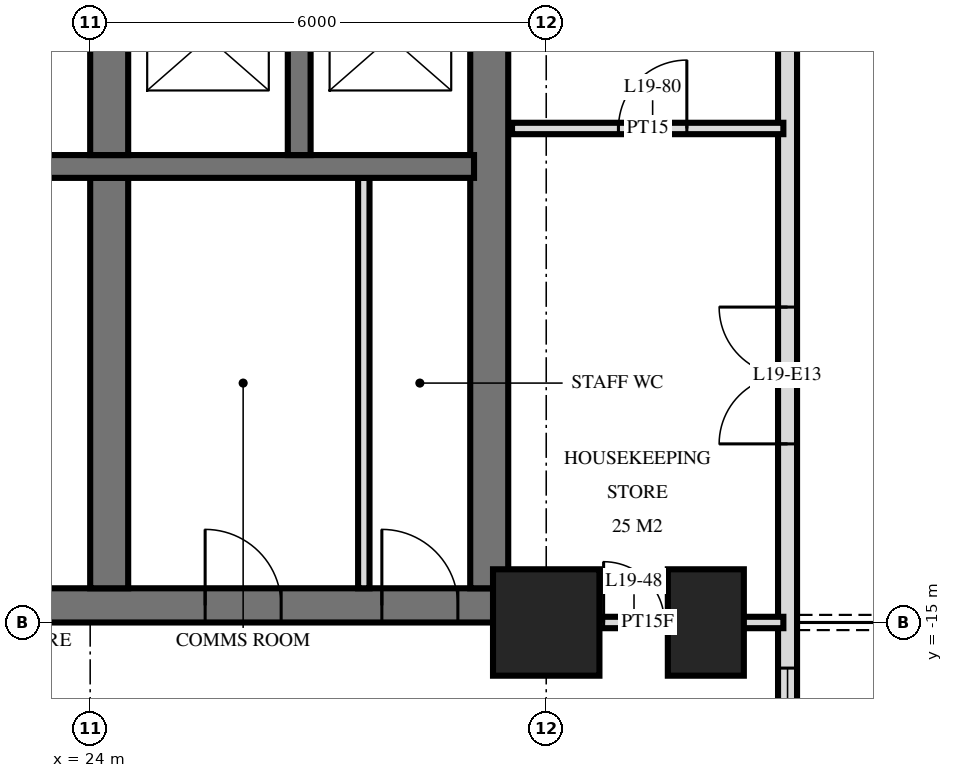
"""IFC4 building model, lengths in metres.
Left out: names, types, materials, properties, quantities, classifications, styles, units other than length and angle.
Written with IfcOpenShell. Run it as: python <this file> out.ifc"""

import sys

from ifc_helpers import new_model, si_unit, direction, frame, frame_2d, origin, origin_2d, place, context, subcontext, project, spatial, rectangle, extrude, element, fill, save


model = new_model("IFC4")
c1 = context("Model", 3, precision=1e-05, world=origin(), true_north=direction((0.0, 1.0)))
c2 = subcontext(c1, "Body", "Model", "MODEL_VIEW")
j1 = project(units=[si_unit("LENGTHUNIT", "METRE"), si_unit("PLANEANGLEUNIT", "RADIAN")], contexts=[c1])
p1 = place(None, origin())
s1 = spatial("IfcSite", under=j1, at=p1, CompositionType="ELEMENT")
p2 = place(p1, origin())
s2 = spatial("IfcBuilding", under=s1, at=p2, CompositionType="ELEMENT")
p3 = place(p2, frame((0.0, 0.0, 78.0)))
s3 = spatial("IfcBuildingStorey", under=s2, at=p3, CompositionType="ELEMENT", Elevation=78.0)
p4 = place(p3, frame((30.0, -15.0, 0.0), z_axis=(0.0, 0.0, 1.0), x_axis=(1.0, 0.0, 0.0)))
e1 = element("IfcColumn", 1, at=p4, inside=s3, PredefinedType="COLUMN", context=c2, shape_type="SweptSolid", body=[
    extrude(rectangle(XDim=1.4, YDim=1.4, at=origin_2d()), origin(), (0.0, 0.0, 1.0), 3.6),
])
p5 = place(p3, frame((32.1, -15.0, 0.0), z_axis=(0.0, 0.0, 1.0), x_axis=(0.0, 1.0, 0.0)))
e2 = element("IfcColumn", 2, at=p5, inside=s3, PredefinedType="COLUMN", context=c2, shape_type="SweptSolid", body=[
    extrude(rectangle(XDim=1.4, YDim=1.0, at=origin_2d()), origin(), (0.0, 0.0, 1.0), 3.6),
])
p6 = place(p3, frame((10.0, -14.775, 0.0), z_axis=(0.0, 0.0, 1.0), x_axis=(1.0, 0.0, 0.0)))
e3 = element("IfcWall", 3, at=p6, inside=s3, PredefinedType="SHEAR", context=c2, shape_type="SweptSolid", body=[
    extrude(rectangle(XDim=19.5, YDim=0.45, at=frame_2d((9.75, 0.0))), origin(), (0.0, 0.0, 1.0), 3.6),
])
p7 = place(p6, frame((7.1, 0.0, 0.0)))
e4 = element("IfcOpeningElement", 4, at=p7, cuts=e3, PredefinedType="OPENING", context=c2, shape_type="SweptSolid", body=[
    extrude(rectangle(XDim=1.2, YDim=2.1, at=frame_2d((0.6, 1.05))), frame((0.0, 0.235, 0.0), z_axis=(0.0, -1.0, 0.0), x_axis=(1.0, 0.0, 0.0)), (0.0, 0.0, 1.0), 0.47),
])
p8 = place(p6, frame((4.15, 0.0, 0.0)))
e5 = element("IfcOpeningElement", 5, at=p8, cuts=e3, PredefinedType="OPENING", context=c2, shape_type="SweptSolid", body=[
    extrude(rectangle(XDim=1.1, YDim=2.1, at=frame_2d((0.55, 1.05))), frame((0.0, 0.235, 0.0), z_axis=(0.0, -1.0, 0.0), x_axis=(1.0, 0.0, 0.0)), (0.0, 0.0, 1.0), 0.47),
])
p9 = place(p6, frame((10.1, 0.0, 0.0)))
e6 = element("IfcOpeningElement", 6, at=p9, cuts=e3, PredefinedType="OPENING", context=c2, shape_type="SweptSolid", body=[
    extrude(rectangle(XDim=0.9, YDim=2.1, at=frame_2d((0.45, 1.05))), frame((0.0, 0.235, 0.0), z_axis=(0.0, -1.0, 0.0), x_axis=(1.0, 0.0, 0.0)), (0.0, 0.0, 1.0), 0.47),
])
p10 = place(p6, frame((12.45, 0.0, 0.0)))
e7 = element("IfcOpeningElement", 7, at=p10, cuts=e3, PredefinedType="OPENING", context=c2, shape_type="SweptSolid", body=[
    extrude(rectangle(XDim=1.0, YDim=2.1, at=frame_2d((0.5, 1.05))), frame((0.0, 0.235, 0.0), z_axis=(0.0, -1.0, 0.0), x_axis=(1.0, 0.0, 0.0)), (0.0, 0.0, 1.0), 0.47),
])
p11 = place(p6, frame((15.512, 0.0, 0.0)))
e8 = element("IfcOpeningElement", 8, at=p11, cuts=e3, PredefinedType="OPENING", context=c2, shape_type="SweptSolid", body=[
    extrude(rectangle(XDim=1.0, YDim=2.1, at=frame_2d((0.5, 1.05))), frame((0.0, 0.235, 0.0), z_axis=(0.0, -1.0, 0.0), x_axis=(1.0, 0.0, 0.0)), (0.0, 0.0, 1.0), 0.47),
])
p12 = place(p6, frame((17.837, 0.0, 0.0)))
e9 = element("IfcOpeningElement", 9, at=p12, cuts=e3, PredefinedType="OPENING", context=c2, shape_type="SweptSolid", body=[
    extrude(rectangle(XDim=1.0, YDim=2.1, at=frame_2d((0.5, 1.05))), frame((0.0, 0.235, 0.0), z_axis=(0.0, -1.0, 0.0), x_axis=(1.0, 0.0, 0.0)), (0.0, 0.0, 1.0), 0.47),
])
p13 = place(p3, frame((29.25, -14.55, 0.0), z_axis=(0.0, 0.0, 1.0), x_axis=(0.0, 1.0, 0.0)))
e10 = element("IfcWall", 10, at=p13, inside=s3, PredefinedType="SHEAR", context=c2, shape_type="SweptSolid", body=[
    extrude(rectangle(XDim=14.1, YDim=0.5, at=frame_2d((7.05, 0.0))), origin(), (0.0, 0.0, 1.0), 3.6),
])
p14 = place(p3, frame((10.35, -9.0, 0.0), z_axis=(0.0, 0.0, 1.0), x_axis=(1.0, 0.0, 0.0)))
e11 = element("IfcWall", 11, at=p14, inside=s3, PredefinedType="SHEAR", context=c2, shape_type="SweptSolid", body=[
    extrude(rectangle(XDim=18.7, YDim=0.3, at=frame_2d((9.35, 0.0))), origin(), (0.0, 0.0, 1.0), 3.6),
])
p15 = place(p14, frame((3.8, 0.0, 0.0)))
e12 = element("IfcOpeningElement", 12, at=p15, cuts=e11, PredefinedType="OPENING", context=c2, shape_type="SweptSolid", body=[
    extrude(rectangle(XDim=1.1, YDim=2.1, at=frame_2d((0.55, 1.05))), frame((0.0, 0.16, 0.0), z_axis=(0.0, -1.0, 0.0), x_axis=(1.0, 0.0, 0.0)), (0.0, 0.0, 1.0), 0.32),
])
p16 = place(p3, frame((24.25, -8.85, 0.0), z_axis=(0.0, 0.0, 1.0), x_axis=(0.0, 1.0, 0.0)))
e13 = element("IfcWall", 13, at=p16, inside=s3, PredefinedType="SHEAR", context=c2, shape_type="SweptSolid", body=[
    extrude(rectangle(XDim=2.3, YDim=0.5, at=frame_2d((1.15, 0.0))), origin(), (0.0, 0.0, 1.0), 3.6),
])
p17 = place(p3, frame((24.25, -14.55, 0.0), z_axis=(0.0, 0.0, 1.0), x_axis=(0.0, 1.0, 0.0)))
e14 = element("IfcWall", 14, at=p17, inside=s3, PredefinedType="SHEAR", context=c2, shape_type="SweptSolid", body=[
    extrude(rectangle(XDim=5.4, YDim=0.5, at=frame_2d((2.7, 0.0))), origin(), (0.0, 0.0, 1.0), 3.6),
])
p18 = place(p3, frame((26.75, -8.85, 0.0), z_axis=(0.0, 0.0, 1.0), x_axis=(0.0, 1.0, 0.0)))
e15 = element("IfcWall", 15, at=p18, inside=s3, PredefinedType="SHEAR", context=c2, shape_type="SweptSolid", body=[
    extrude(rectangle(XDim=2.3, YDim=0.3, at=frame_2d((1.15, 0.0))), origin(), (0.0, 0.0, 1.0), 3.6),
])
p19 = place(p3, frame((33.175, -24.875, 0.0), z_axis=(0.0, 0.0, 1.0), x_axis=(0.0, 1.0, 0.0)))
e16 = element("IfcWall", 16, at=p19, inside=s3, PredefinedType="SOLIDWALL", context=c2, shape_type="SweptSolid", body=[
    extrude(rectangle(XDim=21.551, YDim=0.25, at=frame_2d((10.775, 0.0))), origin(), (0.0, 0.0, 1.0), 3.32),
])
p20 = place(p19, frame((0.575, 0.0, 0.0)))
e17 = element("IfcOpeningElement", 17, at=p20, cuts=e16, PredefinedType="OPENING", context=c2, shape_type="SweptSolid", body=[
    extrude(rectangle(XDim=1.8, YDim=2.4, at=frame_2d((0.9, 1.2))), frame((0.0, 0.135, 0.0), z_axis=(0.0, -1.0, 0.0), x_axis=(1.0, 0.0, 0.0)), (0.0, 0.0, 1.0), 0.27),
])
p21 = place(p19, frame((3.875, 0.0, 0.0)))
e18 = element("IfcOpeningElement", 18, at=p21, cuts=e16, PredefinedType="OPENING", context=c2, shape_type="SweptSolid", body=[
    extrude(rectangle(XDim=1.8, YDim=2.4, at=frame_2d((0.9, 1.2))), frame((0.0, 0.135, 0.0), z_axis=(0.0, -1.0, 0.0), x_axis=(1.0, 0.0, 0.0)), (0.0, 0.0, 1.0), 0.27),
])
p22 = place(p19, frame((8.075, 0.0, 0.3)))
e19 = element("IfcOpeningElement", 19, at=p22, cuts=e16, PredefinedType="OPENING", context=c2, shape_type="SweptSolid", body=[
    extrude(rectangle(XDim=1.2, YDim=2.1, at=frame_2d((0.6, 1.05))), frame((0.0, 0.135, 0.0), z_axis=(0.0, -1.0, 0.0), x_axis=(1.0, 0.0, 0.0)), (0.0, 0.0, 1.0), 0.27),
])
p23 = place(p19, frame((12.225, 0.0, 0.0)))
e20 = element("IfcOpeningElement", 20, at=p23, cuts=e16, PredefinedType="OPENING", context=c2, shape_type="SweptSolid", body=[
    extrude(rectangle(XDim=1.8, YDim=2.4, at=frame_2d((0.9, 1.2))), frame((0.0, 0.135, 0.0), z_axis=(0.0, -1.0, 0.0), x_axis=(1.0, 0.0, 0.0)), (0.0, 0.0, 1.0), 0.27),
])
p24 = place(p3, frame((27.6, -14.55, 0.0), z_axis=(0.0, 0.0, 1.0), x_axis=(0.0, 1.0, 0.0)))
e21 = element("IfcWall", 21, at=p24, inside=s3, PredefinedType="PARTITIONING", context=c2, shape_type="SweptSolid", body=[
    extrude(rectangle(XDim=5.4, YDim=0.15, at=frame_2d((2.7, 0.0))), origin(), (0.0, 0.0, 1.0), 3.3),
])
p25 = place(p3, frame((29.55, -15.0, 0.0), z_axis=(0.0, 0.0, 1.0), x_axis=(1.0, 0.0, 0.0)))
e22 = element("IfcWall", 22, at=p25, inside=s3, PredefinedType="PARTITIONING", context=c2, shape_type="SweptSolid", body=[
    extrude(rectangle(XDim=3.57, YDim=0.15, at=frame_2d((1.785, 0.0))), origin(), (0.0, 0.0, 1.0), 3.32),
])
p26 = place(p25, frame((1.205, 0.0, 0.0)))
e23 = element("IfcOpeningElement", 23, at=p26, cuts=e22, PredefinedType="OPENING", context=c2, shape_type="SweptSolid", body=[
    extrude(rectangle(XDim=0.8, YDim=2.1, at=frame_2d((0.4, 1.05))), frame((0.0, 0.085, 0.0), z_axis=(0.0, -1.0, 0.0), x_axis=(1.0, 0.0, 0.0)), (0.0, 0.0, 1.0), 0.17),
])
p27 = place(p3, frame((29.55, -8.5, 0.0), z_axis=(0.0, 0.0, 1.0), x_axis=(1.0, 0.0, 0.0)))
e24 = element("IfcWall", 24, at=p27, inside=s3, PredefinedType="PARTITIONING", context=c2, shape_type="SweptSolid", body=[
    extrude(rectangle(XDim=3.57, YDim=0.15, at=frame_2d((1.785, 0.0))), origin(), (0.0, 0.0, 1.0), 3.32),
])
p28 = place(p27, frame((1.4, 0.0, 0.0)))
e25 = element("IfcOpeningElement", 25, at=p28, cuts=e24, PredefinedType="OPENING", context=c2, shape_type="SweptSolid", body=[
    extrude(rectangle(XDim=0.9, YDim=2.1, at=frame_2d((0.45, 1.05))), frame((0.0, 0.085, 0.0), z_axis=(0.0, -1.0, 0.0), x_axis=(1.0, 0.0, 0.0)), (0.0, 0.0, 1.0), 0.17),
])
p29 = place(p22, origin())
e26 = element("IfcWindow", 26, at=p29, inside=s3, PartitioningType="SINGLE_PANEL", PredefinedType="WINDOW", context=c2, shape_type="SweptSolid", body=[
    extrude(rectangle(XDim=1.2, YDim=2.1, at=frame_2d((0.6, 1.05))), frame((0.0, 0.03, 0.0), z_axis=(0.0, -1.0, 0.0), x_axis=(1.0, 0.0, 0.0)), (0.0, 0.0, 1.0), 0.06),
])
fill(e19, e26)
p30 = place(p23, origin())
e27 = element("IfcDoor", 27, at=p30, inside=s3, OperationType="DOUBLE_DOOR_SINGLE_SWING", PredefinedType="DOOR", context=c2, shape_type="SweptSolid", body=[
    extrude(rectangle(XDim=1.8, YDim=2.4, at=frame_2d((0.9, 1.2))), frame((0.0, 0.025, 0.0), z_axis=(0.0, -1.0, 0.0), x_axis=(1.0, 0.0, 0.0)), (0.0, 0.0, 1.0), 0.05),
])
fill(e20, e27)
p31 = place(p11, origin())
e28 = element("IfcDoor", 28, at=p31, inside=s3, OperationType="SINGLE_SWING_RIGHT", PredefinedType="DOOR", context=c2, shape_type="SweptSolid", body=[
    extrude(rectangle(XDim=1.0, YDim=2.1, at=frame_2d((0.5, 1.05))), frame((0.0, 0.025, 0.0), z_axis=(0.0, -1.0, 0.0), x_axis=(1.0, 0.0, 0.0)), (0.0, 0.0, 1.0), 0.05),
])
fill(e8, e28)
p32 = place(p12, origin())
e29 = element("IfcDoor", 29, at=p32, inside=s3, OperationType="SINGLE_SWING_RIGHT", PredefinedType="DOOR", context=c2, shape_type="SweptSolid", body=[
    extrude(rectangle(XDim=1.0, YDim=2.1, at=frame_2d((0.5, 1.05))), frame((0.0, 0.025, 0.0), z_axis=(0.0, -1.0, 0.0), x_axis=(1.0, 0.0, 0.0)), (0.0, 0.0, 1.0), 0.05),
])
fill(e9, e29)
p33 = place(p26, origin())
e30 = element("IfcDoor", 30, at=p33, inside=s3, OperationType="SINGLE_SWING_RIGHT", PredefinedType="DOOR", context=c2, shape_type="SweptSolid", body=[
    extrude(rectangle(XDim=0.8, YDim=2.1, at=frame_2d((0.4, 1.05))), frame((0.0, 0.025, 0.0), z_axis=(0.0, -1.0, 0.0), x_axis=(1.0, 0.0, 0.0)), (0.0, 0.0, 1.0), 0.05),
])
fill(e23, e30)
p34 = place(p28, origin())
e31 = element("IfcDoor", 31, at=p34, inside=s3, OperationType="SINGLE_SWING_LEFT", PredefinedType="DOOR", context=c2, shape_type="SweptSolid", body=[
    extrude(rectangle(XDim=0.9, YDim=2.1, at=frame_2d((0.45, 1.05))), frame((0.0, 0.025, 0.0), z_axis=(0.0, -1.0, 0.0), x_axis=(1.0, 0.0, 0.0)), (0.0, 0.0, 1.0), 0.05),
])
fill(e25, e31)
save(model, sys.argv[1])
